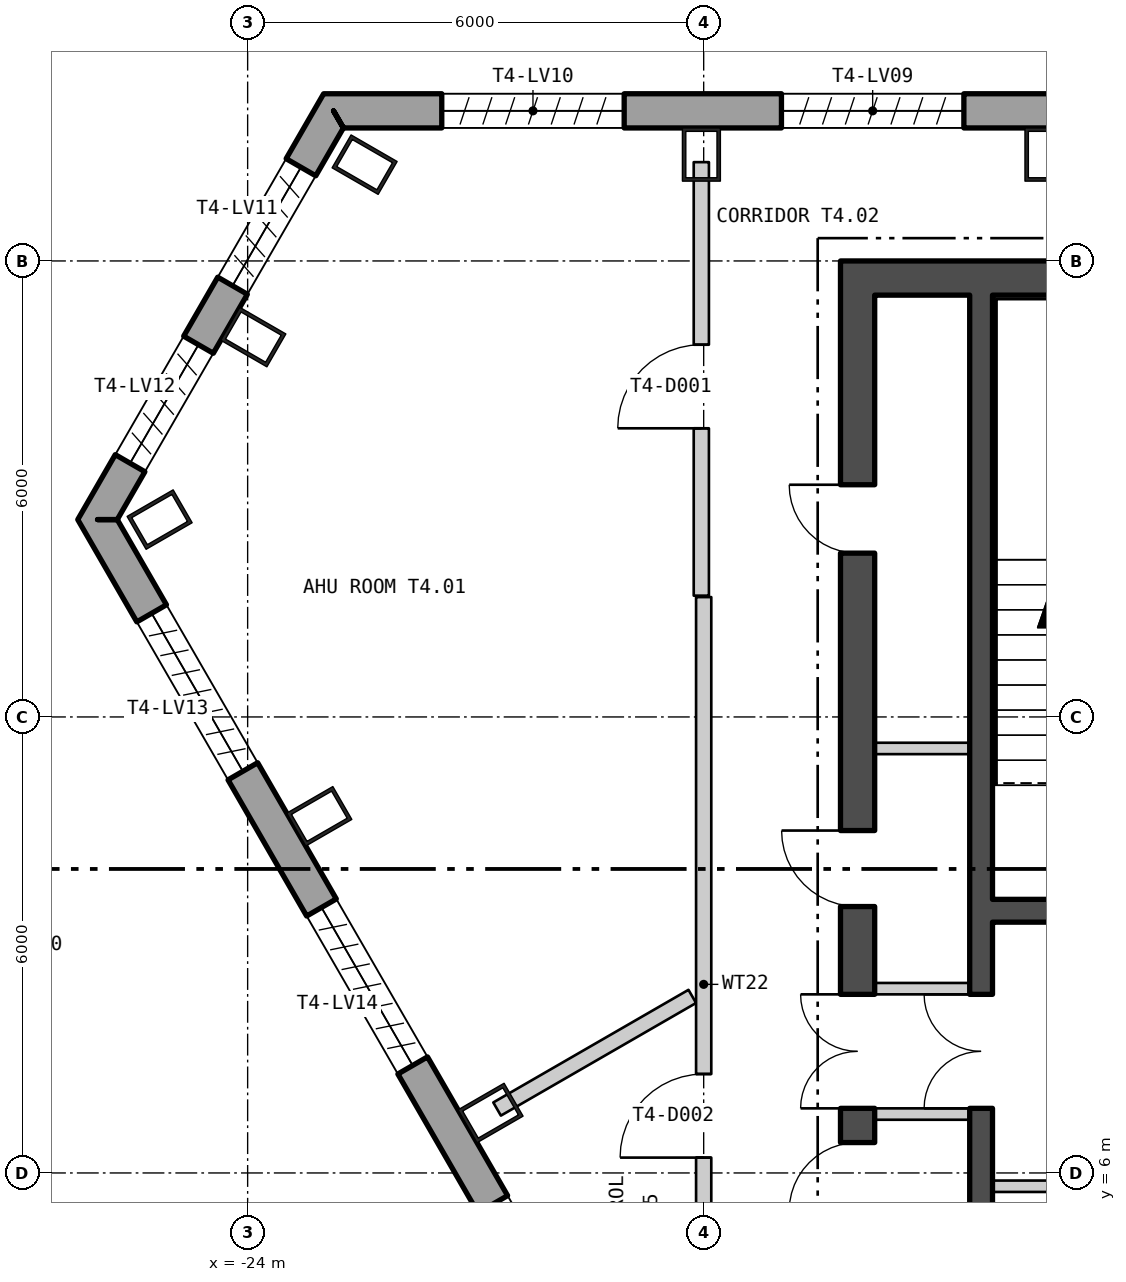
"""IFC4 building model, lengths in metres.
Left out: names, types, materials, properties, quantities, classifications, styles, units other than length and angle.
Written with IfcOpenShell. Run it as: python <this file> out.ifc"""

import sys

from ifc_helpers import new_model, si_unit, direction, frame, frame_2d, origin, origin_2d, place, context, subcontext, project, spatial, polyline, rectangle, hollow_rectangle, outline, extrude, element, fill, save


model = new_model("IFC4")
c1 = context("Model", 3, precision=1e-05, world=origin(), true_north=direction((0.0, 1.0)))
c2 = subcontext(c1, "Body", "Model", "MODEL_VIEW")
j1 = project(units=[si_unit("LENGTHUNIT", "METRE"), si_unit("PLANEANGLEUNIT", "RADIAN")], contexts=[c1])
p1 = place(None, origin())
s1 = spatial("IfcSite", under=j1, at=p1, CompositionType="ELEMENT")
p2 = place(p1, origin())
s2 = spatial("IfcBuilding", under=s1, at=p2, CompositionType="ELEMENT")
p3 = place(p2, frame((0.0, 0.0, 239.4)))
s3 = spatial("IfcBuildingStorey", under=s2, at=p3, CompositionType="ELEMENT", Elevation=239.4)
for number, where, z_axis, x_axis in (
    (1, (-13.523, 19.4, 0.0), (0.0, 0.0, 1.0), (-1.0, 0.0, 0.0)),
    (2, (-18.03, 19.4, 0.0), (0.0, 0.0, 1.0), (-1.0, 0.0, 0.0)),
    (3, (-22.461, 19.267, 0.0), (0.0, 0.0, 1.0), (-0.5, -0.866, 0.0)),
    (4, (-23.925, 16.998, 0.0), (0.0, 0.0, 1.0), (-0.5, -0.866, 0.0)),
    (5, (-25.158, 14.597, 0.0), (0.0, 0.0, 1.0), (0.5, -0.866, 0.0)),
    (6, (-23.057, 10.693, 0.0), (0.0, 0.0, 1.0), (0.5, -0.866, 0.0)),
    (7, (-20.804, 6.789, 0.0), (0.0, 0.0, 1.0), (0.5, -0.866, 0.0)),
):
    element("IfcColumn", number, at=place(p3, frame(where, z_axis=z_axis, x_axis=x_axis)), inside=s3, PredefinedType="COLUMN", context=c2, shape_type="SweptSolid", body=[
        extrude(hollow_rectangle(XDim=0.5, YDim=0.7, WallThickness=0.045, at=origin_2d()), origin(), (0.0, 0.0, 1.0), 6.0),
    ])
p4 = place(p3, frame((22.87, 19.975, -0.4), z_axis=(0.0, 0.0, 1.0), x_axis=(-1.0, 0.0, 0.0)))
e8 = element("IfcWall", 8, at=p4, inside=s3, PredefinedType="SOLIDWALL", context=c2, shape_type="SweptSolid", body=[
    extrude(outline(polyline([(-0.13, -0.225), (45.87, -0.225), (45.61, 0.225), (0.13, 0.225), (-0.13, -0.225)])), origin(), (0.0, 0.0, 1.0), 6.0),
])
p5 = place(p4, frame((1.424, 0.0, 1.6)))
e9 = element("IfcOpeningElement", 9, at=p5, cuts=e8, PredefinedType="OPENING", context=c2, shape_type="SweptSolid", body=[
    extrude(rectangle(XDim=2.4, YDim=3.6, at=frame_2d((1.2, 1.8))), frame((0.0, 0.235, 0.0), z_axis=(0.0, -1.0, 0.0), x_axis=(1.0, 0.0, 0.0)), (0.0, 0.0, 1.0), 0.47),
])
p6 = place(p4, frame((5.893, 0.0, 1.6)))
e10 = element("IfcOpeningElement", 10, at=p6, cuts=e8, PredefinedType="OPENING", context=c2, shape_type="SweptSolid", body=[
    extrude(rectangle(XDim=2.4, YDim=3.6, at=frame_2d((1.2, 1.8))), frame((0.0, 0.235, 0.0), z_axis=(0.0, -1.0, 0.0), x_axis=(1.0, 0.0, 0.0)), (0.0, 0.0, 1.0), 0.47),
])
p7 = place(p4, frame((10.401, 0.0, 1.6)))
e11 = element("IfcOpeningElement", 11, at=p7, cuts=e8, PredefinedType="OPENING", context=c2, shape_type="SweptSolid", body=[
    extrude(rectangle(XDim=2.4, YDim=3.6, at=frame_2d((1.2, 1.8))), frame((0.0, 0.235, 0.0), z_axis=(0.0, -1.0, 0.0), x_axis=(1.0, 0.0, 0.0)), (0.0, 0.0, 1.0), 0.47),
])
p8 = place(p4, frame((14.909, 0.0, 1.6)))
e12 = element("IfcOpeningElement", 12, at=p8, cuts=e8, PredefinedType="OPENING", context=c2, shape_type="SweptSolid", body=[
    extrude(rectangle(XDim=2.4, YDim=3.6, at=frame_2d((1.2, 1.8))), frame((0.0, 0.235, 0.0), z_axis=(0.0, -1.0, 0.0), x_axis=(1.0, 0.0, 0.0)), (0.0, 0.0, 1.0), 0.47),
])
p9 = place(p4, frame((19.416, 0.0, 1.6)))
e13 = element("IfcOpeningElement", 13, at=p9, cuts=e8, PredefinedType="OPENING", context=c2, shape_type="SweptSolid", body=[
    extrude(rectangle(XDim=2.4, YDim=3.6, at=frame_2d((1.2, 1.8))), frame((0.0, 0.235, 0.0), z_axis=(0.0, -1.0, 0.0), x_axis=(1.0, 0.0, 0.0)), (0.0, 0.0, 1.0), 0.47),
])
p10 = place(p4, frame((23.924, 0.0, 1.6)))
e14 = element("IfcOpeningElement", 14, at=p10, cuts=e8, PredefinedType="OPENING", context=c2, shape_type="SweptSolid", body=[
    extrude(rectangle(XDim=2.4, YDim=3.6, at=frame_2d((1.2, 1.8))), frame((0.0, 0.235, 0.0), z_axis=(0.0, -1.0, 0.0), x_axis=(1.0, 0.0, 0.0)), (0.0, 0.0, 1.0), 0.47),
])
p11 = place(p4, frame((28.431, 0.0, 1.6)))
e15 = element("IfcOpeningElement", 15, at=p11, cuts=e8, PredefinedType="OPENING", context=c2, shape_type="SweptSolid", body=[
    extrude(rectangle(XDim=2.4, YDim=3.6, at=frame_2d((1.2, 1.8))), frame((0.0, 0.235, 0.0), z_axis=(0.0, -1.0, 0.0), x_axis=(1.0, 0.0, 0.0)), (0.0, 0.0, 1.0), 0.47),
])
p12 = place(p4, frame((32.939, 0.0, 1.6)))
e16 = element("IfcOpeningElement", 16, at=p12, cuts=e8, PredefinedType="OPENING", context=c2, shape_type="SweptSolid", body=[
    extrude(rectangle(XDim=2.4, YDim=3.6, at=frame_2d((1.2, 1.8))), frame((0.0, 0.235, 0.0), z_axis=(0.0, -1.0, 0.0), x_axis=(1.0, 0.0, 0.0)), (0.0, 0.0, 1.0), 0.47),
])
p13 = place(p4, frame((37.447, 0.0, 1.6)))
e17 = element("IfcOpeningElement", 17, at=p13, cuts=e8, PredefinedType="OPENING", context=c2, shape_type="SweptSolid", body=[
    extrude(rectangle(XDim=2.4, YDim=3.6, at=frame_2d((1.2, 1.8))), frame((0.0, 0.235, 0.0), z_axis=(0.0, -1.0, 0.0), x_axis=(1.0, 0.0, 0.0)), (0.0, 0.0, 1.0), 0.47),
])
p14 = place(p4, frame((41.916, 0.0, 1.6)))
e18 = element("IfcOpeningElement", 18, at=p14, cuts=e8, PredefinedType="OPENING", context=c2, shape_type="SweptSolid", body=[
    extrude(rectangle(XDim=2.4, YDim=3.6, at=frame_2d((1.2, 1.8))), frame((0.0, 0.235, 0.0), z_axis=(0.0, -1.0, 0.0), x_axis=(1.0, 0.0, 0.0)), (0.0, 0.0, 1.0), 0.47),
])
p15 = place(p3, frame((-22.87, 19.975, -0.4), z_axis=(0.0, 0.0, 1.0), x_axis=(-0.499999369857, -0.866025767597, 0.0)))
e19 = element("IfcWall", 19, at=p15, inside=s3, PredefinedType="SOLIDWALL", context=c2, shape_type="SweptSolid", body=[
    extrude(outline(polyline([(-0.13, -0.225), (6.34, -0.225), (6.08, 0.225), (0.13, 0.225), (-0.13, -0.225)])), origin(), (0.0, 0.0, 1.0), 6.0),
])
p16 = place(p15, frame((0.857, 0.0, 1.6)))
e20 = element("IfcOpeningElement", 20, at=p16, cuts=e19, PredefinedType="OPENING", context=c2, shape_type="SweptSolid", body=[
    extrude(rectangle(XDim=1.8, YDim=3.6, at=frame_2d((0.9, 1.8))), frame((0.0, 0.235, 0.0), z_axis=(0.0, -1.0, 0.0), x_axis=(1.0, 0.0, 0.0)), (0.0, 0.0, 1.0), 0.47),
])
p17 = place(p15, frame((3.553, 0.0, 1.6)))
e21 = element("IfcOpeningElement", 21, at=p17, cuts=e19, PredefinedType="OPENING", context=c2, shape_type="SweptSolid", body=[
    extrude(rectangle(XDim=1.8, YDim=3.6, at=frame_2d((0.9, 1.8))), frame((0.0, 0.235, 0.0), z_axis=(0.0, -1.0, 0.0), x_axis=(1.0, 0.0, 0.0)), (0.0, 0.0, 1.0), 0.47),
])
p18 = place(p3, frame((-25.975, 14.597, -0.18), z_axis=(0.0, 0.0, 1.0), x_axis=(0.499999764979, -0.866025539474, 0.0)))
e22 = element("IfcWall", 22, at=p18, inside=s3, PredefinedType="SOLIDWALL", context=c2, shape_type="SweptSolid", body=[
    extrude(outline(polyline([(-0.13, -0.225), (45.87, -0.225), (45.61, 0.225), (0.13, 0.225), (-0.13, -0.225)])), origin(), (0.0, 0.0, 1.0), 6.0),
])
p19 = place(p18, frame((1.424, 0.0, 1.38)))
e23 = element("IfcOpeningElement", 23, at=p19, cuts=e22, PredefinedType="OPENING", context=c2, shape_type="SweptSolid", body=[
    extrude(rectangle(XDim=2.4, YDim=3.6, at=frame_2d((1.2, 1.8))), frame((0.0, 0.235, 0.0), z_axis=(0.0, -1.0, 0.0), x_axis=(1.0, 0.0, 0.0)), (0.0, 0.0, 1.0), 0.47),
])
p20 = place(p18, frame((5.893, 0.0, 1.38)))
e24 = element("IfcOpeningElement", 24, at=p20, cuts=e22, PredefinedType="OPENING", context=c2, shape_type="SweptSolid", body=[
    extrude(rectangle(XDim=2.4, YDim=3.6, at=frame_2d((1.2, 1.8))), frame((0.0, 0.235, 0.0), z_axis=(0.0, -1.0, 0.0), x_axis=(1.0, 0.0, 0.0)), (0.0, 0.0, 1.0), 0.47),
])
p21 = place(p18, frame((10.401, 0.0, 1.38)))
e25 = element("IfcOpeningElement", 25, at=p21, cuts=e22, PredefinedType="OPENING", context=c2, shape_type="SweptSolid", body=[
    extrude(rectangle(XDim=2.4, YDim=3.6, at=frame_2d((1.2, 1.8))), frame((0.0, 0.235, 0.0), z_axis=(0.0, -1.0, 0.0), x_axis=(1.0, 0.0, 0.0)), (0.0, 0.0, 1.0), 0.47),
])
p22 = place(p18, frame((14.909, 0.0, 1.38)))
e26 = element("IfcOpeningElement", 26, at=p22, cuts=e22, PredefinedType="OPENING", context=c2, shape_type="SweptSolid", body=[
    extrude(rectangle(XDim=2.4, YDim=3.6, at=frame_2d((1.2, 1.8))), frame((0.0, 0.235, 0.0), z_axis=(0.0, -1.0, 0.0), x_axis=(1.0, 0.0, 0.0)), (0.0, 0.0, 1.0), 0.47),
])
p23 = place(p18, frame((19.416, 0.0, 1.38)))
e27 = element("IfcOpeningElement", 27, at=p23, cuts=e22, PredefinedType="OPENING", context=c2, shape_type="SweptSolid", body=[
    extrude(rectangle(XDim=2.4, YDim=3.6, at=frame_2d((1.2, 1.8))), frame((0.0, 0.235, 0.0), z_axis=(0.0, -1.0, 0.0), x_axis=(1.0, 0.0, 0.0)), (0.0, 0.0, 1.0), 0.47),
])
p24 = place(p18, frame((23.924, 0.0, 1.38)))
e28 = element("IfcOpeningElement", 28, at=p24, cuts=e22, PredefinedType="OPENING", context=c2, shape_type="SweptSolid", body=[
    extrude(rectangle(XDim=2.4, YDim=3.6, at=frame_2d((1.2, 1.8))), frame((0.0, 0.235, 0.0), z_axis=(0.0, -1.0, 0.0), x_axis=(1.0, 0.0, 0.0)), (0.0, 0.0, 1.0), 0.47),
])
p25 = place(p18, frame((28.431, 0.0, 1.38)))
e29 = element("IfcOpeningElement", 29, at=p25, cuts=e22, PredefinedType="OPENING", context=c2, shape_type="SweptSolid", body=[
    extrude(rectangle(XDim=2.4, YDim=3.6, at=frame_2d((1.2, 1.8))), frame((0.0, 0.235, 0.0), z_axis=(0.0, -1.0, 0.0), x_axis=(1.0, 0.0, 0.0)), (0.0, 0.0, 1.0), 0.47),
])
p26 = place(p18, frame((32.939, 0.0, 1.38)))
e30 = element("IfcOpeningElement", 30, at=p26, cuts=e22, PredefinedType="OPENING", context=c2, shape_type="SweptSolid", body=[
    extrude(rectangle(XDim=2.4, YDim=3.6, at=frame_2d((1.2, 1.8))), frame((0.0, 0.235, 0.0), z_axis=(0.0, -1.0, 0.0), x_axis=(1.0, 0.0, 0.0)), (0.0, 0.0, 1.0), 0.47),
])
p27 = place(p18, frame((37.447, 0.0, 1.38)))
e31 = element("IfcOpeningElement", 31, at=p27, cuts=e22, PredefinedType="OPENING", context=c2, shape_type="SweptSolid", body=[
    extrude(rectangle(XDim=2.4, YDim=3.6, at=frame_2d((1.2, 1.8))), frame((0.0, 0.235, 0.0), z_axis=(0.0, -1.0, 0.0), x_axis=(1.0, 0.0, 0.0)), (0.0, 0.0, 1.0), 0.47),
])
p28 = place(p18, frame((41.916, 0.0, 1.38)))
e32 = element("IfcOpeningElement", 32, at=p28, cuts=e22, PredefinedType="OPENING", context=c2, shape_type="SweptSolid", body=[
    extrude(rectangle(XDim=2.4, YDim=3.6, at=frame_2d((1.2, 1.8))), frame((0.0, 0.235, 0.0), z_axis=(0.0, -1.0, 0.0), x_axis=(1.0, 0.0, 0.0)), (0.0, 0.0, 1.0), 0.47),
])
p29 = place(p3, frame((-16.2, 17.775, 0.0), z_axis=(0.0, 0.0, 1.0), x_axis=(1.0, 0.0, 0.0)))
e33 = element("IfcWall", 33, at=p29, inside=s3, PredefinedType="SHEAR", context=c2, shape_type="SweptSolid", body=[
    extrude(rectangle(XDim=32.4, YDim=0.45, at=frame_2d((16.2, 0.0))), origin(), (0.0, 0.0, 1.0), 5.8),
])
p30 = place(p3, frame((-15.975, 2.45, 0.0), z_axis=(0.0, 0.0, 1.0), x_axis=(0.0, 1.0, 0.0)))
e34 = element("IfcWall", 34, at=p30, inside=s3, PredefinedType="SHEAR", context=c2, shape_type="SweptSolid", body=[
    extrude(rectangle(XDim=15.1, YDim=0.45, at=frame_2d((7.55, 0.0))), origin(), (0.0, 0.0, 1.0), 5.8),
])
p31 = place(p30, frame((4.4, 0.0, 0.0)))
e35 = element("IfcOpeningElement", 35, at=p31, cuts=e34, PredefinedType="OPENING", context=c2, shape_type="SweptSolid", body=[
    extrude(rectangle(XDim=1.5, YDim=2.1, at=frame_2d((0.75, 1.05))), frame((0.0, 0.235, 0.0), z_axis=(0.0, -1.0, 0.0), x_axis=(1.0, 0.0, 0.0)), (0.0, 0.0, 1.0), 0.47),
])
p32 = place(p30, frame((1.086, 0.0, 0.0)))
e36 = element("IfcOpeningElement", 36, at=p32, cuts=e34, PredefinedType="OPENING", context=c2, shape_type="SweptSolid", body=[
    extrude(rectangle(XDim=0.9, YDim=2.1, at=frame_2d((0.45, 1.05))), frame((0.0, 0.235, 0.0), z_axis=(0.0, -1.0, 0.0), x_axis=(1.0, 0.0, 0.0)), (0.0, 0.0, 1.0), 0.47),
])
p33 = place(p30, frame((3.05, 0.0, 0.0)))
e37 = element("IfcOpeningElement", 37, at=p33, cuts=e34, PredefinedType="OPENING", context=c2, shape_type="SweptSolid", body=[
    extrude(rectangle(XDim=0.9, YDim=2.1, at=frame_2d((0.45, 1.05))), frame((0.0, 0.235, 0.0), z_axis=(0.0, -1.0, 0.0), x_axis=(1.0, 0.0, 0.0)), (0.0, 0.0, 1.0), 0.47),
])
p34 = place(p30, frame((7.055, 0.0, 0.0)))
e38 = element("IfcOpeningElement", 38, at=p34, cuts=e34, PredefinedType="OPENING", context=c2, shape_type="SweptSolid", body=[
    extrude(rectangle(XDim=1.0, YDim=2.1, at=frame_2d((0.5, 1.05))), frame((0.0, 0.235, 0.0), z_axis=(0.0, -1.0, 0.0), x_axis=(1.0, 0.0, 0.0)), (0.0, 0.0, 1.0), 0.47),
])
p35 = place(p30, frame((11.705, 0.0, 0.0)))
e39 = element("IfcOpeningElement", 39, at=p35, cuts=e34, PredefinedType="OPENING", context=c2, shape_type="SweptSolid", body=[
    extrude(rectangle(XDim=0.9, YDim=2.1, at=frame_2d((0.45, 1.05))), frame((0.0, 0.235, 0.0), z_axis=(0.0, -1.0, 0.0), x_axis=(1.0, 0.0, 0.0)), (0.0, 0.0, 1.0), 0.47),
])
p36 = place(p3, frame((-14.35, 2.45, 0.0), z_axis=(0.0, 0.0, 1.0), x_axis=(0.0, 1.0, 0.0)))
e40 = element("IfcWall", 40, at=p36, inside=s3, PredefinedType="SHEAR", context=c2, shape_type="SweptSolid", body=[
    extrude(rectangle(XDim=15.1, YDim=0.3, at=frame_2d((7.55, 0.0))), origin(), (0.0, 0.0, 1.0), 5.8),
])
p37 = place(p36, frame((4.4, 0.0, 0.0)))
e41 = element("IfcOpeningElement", 41, at=p37, cuts=e40, PredefinedType="OPENING", context=c2, shape_type="SweptSolid", body=[
    extrude(rectangle(XDim=1.5, YDim=2.1, at=frame_2d((0.75, 1.05))), frame((0.0, 0.16, 0.0), z_axis=(0.0, -1.0, 0.0), x_axis=(1.0, 0.0, 0.0)), (0.0, 0.0, 1.0), 0.32),
])
p38 = place(p3, frame((-14.2, 9.45, 0.0), z_axis=(0.0, 0.0, 1.0), x_axis=(1.0, 0.0, 0.0)))
e42 = element("IfcWall", 42, at=p38, inside=s3, PredefinedType="SHEAR", context=c2, shape_type="SweptSolid", body=[
    extrude(rectangle(XDim=3.2, YDim=0.3, at=frame_2d((1.6, 0.0))), origin(), (0.0, 0.0, 1.0), 5.8),
])
p39 = place(p38, frame((1.0, 0.0, 0.0)))
e43 = element("IfcOpeningElement", 43, at=p39, cuts=e42, PredefinedType="OPENING", context=c2, shape_type="SweptSolid", body=[
    extrude(rectangle(XDim=1.2, YDim=2.1, at=frame_2d((0.6, 1.05))), frame((0.0, 0.16, 0.0), z_axis=(0.0, -1.0, 0.0), x_axis=(1.0, 0.0, 0.0)), (0.0, 0.0, 1.0), 0.32),
])
p40 = place(p3, frame((-14.2, 5.825, 0.0), z_axis=(0.0, 0.0, 1.0), x_axis=(1.0, 0.0, 0.0)))
e44 = element("IfcWall", 44, at=p40, inside=s3, PredefinedType="PARTITIONING", context=c2, shape_type="SweptSolid", body=[
    extrude(rectangle(XDim=3.2, YDim=0.15, at=frame_2d((1.6, 0.0))), origin(), (0.0, 0.0, 1.0), 5.8),
])
for number, where, z_axis, x_axis in (
    (45, (-15.75, 6.775, 0.0), (0.0, 0.0, 1.0), (1.0, 0.0, 0.0)),
    (46, (-15.75, 8.425, 0.0), (0.0, 0.0, 1.0), (1.0, 0.0, 0.0)),
    (47, (-15.75, 11.586, 0.0), (0.0, 0.0, 1.0), (1.0, 0.0, 0.0)),
):
    element("IfcWall", number, at=place(p3, frame(where, z_axis=z_axis, x_axis=x_axis)), inside=s3, PredefinedType="PARTITIONING", context=c2, shape_type="SweptSolid", body=[
        extrude(rectangle(XDim=1.25, YDim=0.15, at=frame_2d((0.625, 0.0))), origin(), (0.0, 0.0, 1.0), 5.8),
    ])
p41 = place(p3, frame((-20.718, 6.841, 0.0), z_axis=(0.0, 0.0, 1.0), x_axis=(0.866118198353, 0.499839240638, 0.0)))
e48 = element("IfcWall", 48, at=p41, inside=s3, PredefinedType="PARTITIONING", context=c2, shape_type="SweptSolid", body=[
    extrude(rectangle(XDim=2.965, YDim=0.2, at=frame_2d((1.482, 0.0))), origin(), (0.0, 0.0, 1.0), 5.8),
])
p42 = place(p3, frame((-18.031, 13.596, 0.0), z_axis=(0.0, 0.0, 1.0), x_axis=(0.0, 1.0, 0.0)))
e49 = element("IfcWall", 49, at=p42, inside=s3, PredefinedType="PARTITIONING", context=c2, shape_type="SweptSolid", body=[
    extrude(rectangle(XDim=5.704, YDim=0.2, at=frame_2d((2.852, 0.0))), origin(), (0.0, 0.0, 1.0), 5.8),
])
p43 = place(p42, frame((2.202, 0.0, 0.0)))
e50 = element("IfcOpeningElement", 50, at=p43, cuts=e49, PredefinedType="OPENING", context=c2, shape_type="SweptSolid", body=[
    extrude(rectangle(XDim=1.1, YDim=2.1, at=frame_2d((0.55, 1.05))), frame((0.0, 0.11, 0.0), z_axis=(0.0, -1.0, 0.0), x_axis=(1.0, 0.0, 0.0)), (0.0, 0.0, 1.0), 0.22),
])
p44 = place(p3, frame((-18.0, 3.386, 0.0), z_axis=(0.0, 0.0, 1.0), x_axis=(0.0, 1.0, 0.0)))
e51 = element("IfcWall", 51, at=p44, inside=s3, PredefinedType="PARTITIONING", context=c2, shape_type="SweptSolid", body=[
    extrude(rectangle(XDim=10.191, YDim=0.2, at=frame_2d((5.096, 0.0))), origin(), (0.0, 0.0, 1.0), 5.8),
])
p45 = place(p44, frame((2.816, 0.0, 0.0)))
e52 = element("IfcOpeningElement", 52, at=p45, cuts=e51, PredefinedType="OPENING", context=c2, shape_type="SweptSolid", body=[
    extrude(rectangle(XDim=1.1, YDim=2.1, at=frame_2d((0.55, 1.05))), frame((0.0, 0.11, 0.0), z_axis=(0.0, -1.0, 0.0), x_axis=(1.0, 0.0, 0.0)), (0.0, 0.0, 1.0), 0.22),
])
p46 = place(p37, origin())
e53 = element("IfcDoor", 53, at=p46, inside=s3, OperationType="DOUBLE_DOOR_SINGLE_SWING", PredefinedType="DOOR", context=c2, shape_type="SweptSolid", body=[
    extrude(rectangle(XDim=1.5, YDim=2.1, at=frame_2d((0.75, 1.05))), frame((0.0, 0.025, 0.0), z_axis=(0.0, -1.0, 0.0), x_axis=(1.0, 0.0, 0.0)), (0.0, 0.0, 1.0), 0.05),
])
fill(e41, e53)
p47 = place(p31, origin())
e54 = element("IfcDoor", 54, at=p47, inside=s3, OperationType="DOUBLE_DOOR_SINGLE_SWING", PredefinedType="DOOR", context=c2, shape_type="SweptSolid", body=[
    extrude(rectangle(XDim=1.5, YDim=2.1, at=frame_2d((0.75, 1.05))), frame((0.0, 0.025, 0.0), z_axis=(0.0, -1.0, 0.0), x_axis=(1.0, 0.0, 0.0)), (0.0, 0.0, 1.0), 0.05),
])
fill(e35, e54)
p48 = place(p33, origin())
e55 = element("IfcDoor", 55, at=p48, inside=s3, OperationType="SINGLE_SWING_RIGHT", PredefinedType="DOOR", context=c2, shape_type="SweptSolid", body=[
    extrude(rectangle(XDim=0.9, YDim=2.1, at=frame_2d((0.45, 1.05))), frame((0.0, 0.025, 0.0), z_axis=(0.0, -1.0, 0.0), x_axis=(1.0, 0.0, 0.0)), (0.0, 0.0, 1.0), 0.05),
])
fill(e37, e55)
p49 = place(p34, origin())
e56 = element("IfcDoor", 56, at=p49, inside=s3, OperationType="SINGLE_SWING_LEFT", PredefinedType="DOOR", context=c2, shape_type="SweptSolid", body=[
    extrude(rectangle(XDim=1.0, YDim=2.1, at=frame_2d((0.5, 1.05))), frame((0.0, 0.025, 0.0), z_axis=(0.0, -1.0, 0.0), x_axis=(1.0, 0.0, 0.0)), (0.0, 0.0, 1.0), 0.05),
])
fill(e38, e56)
p50 = place(p35, origin())
e57 = element("IfcDoor", 57, at=p50, inside=s3, OperationType="SINGLE_SWING_LEFT", PredefinedType="DOOR", context=c2, shape_type="SweptSolid", body=[
    extrude(rectangle(XDim=0.9, YDim=2.1, at=frame_2d((0.45, 1.05))), frame((0.0, 0.025, 0.0), z_axis=(0.0, -1.0, 0.0), x_axis=(1.0, 0.0, 0.0)), (0.0, 0.0, 1.0), 0.05),
])
fill(e39, e57)
p51 = place(p43, origin())
e58 = element("IfcDoor", 58, at=p51, inside=s3, OperationType="SINGLE_SWING_RIGHT", PredefinedType="DOOR", context=c2, shape_type="SweptSolid", body=[
    extrude(rectangle(XDim=1.1, YDim=2.1, at=frame_2d((0.55, 1.05))), frame((0.0, 0.025, 0.0), z_axis=(0.0, -1.0, 0.0), x_axis=(1.0, 0.0, 0.0)), (0.0, 0.0, 1.0), 0.05),
])
fill(e50, e58)
p52 = place(p45, origin())
e59 = element("IfcDoor", 59, at=p52, inside=s3, OperationType="SINGLE_SWING_RIGHT", PredefinedType="DOOR", context=c2, shape_type="SweptSolid", body=[
    extrude(rectangle(XDim=1.1, YDim=2.1, at=frame_2d((0.55, 1.05))), frame((0.0, 0.025, 0.0), z_axis=(0.0, -1.0, 0.0), x_axis=(1.0, 0.0, 0.0)), (0.0, 0.0, 1.0), 0.05),
])
fill(e52, e59)
save(model, sys.argv[1])
